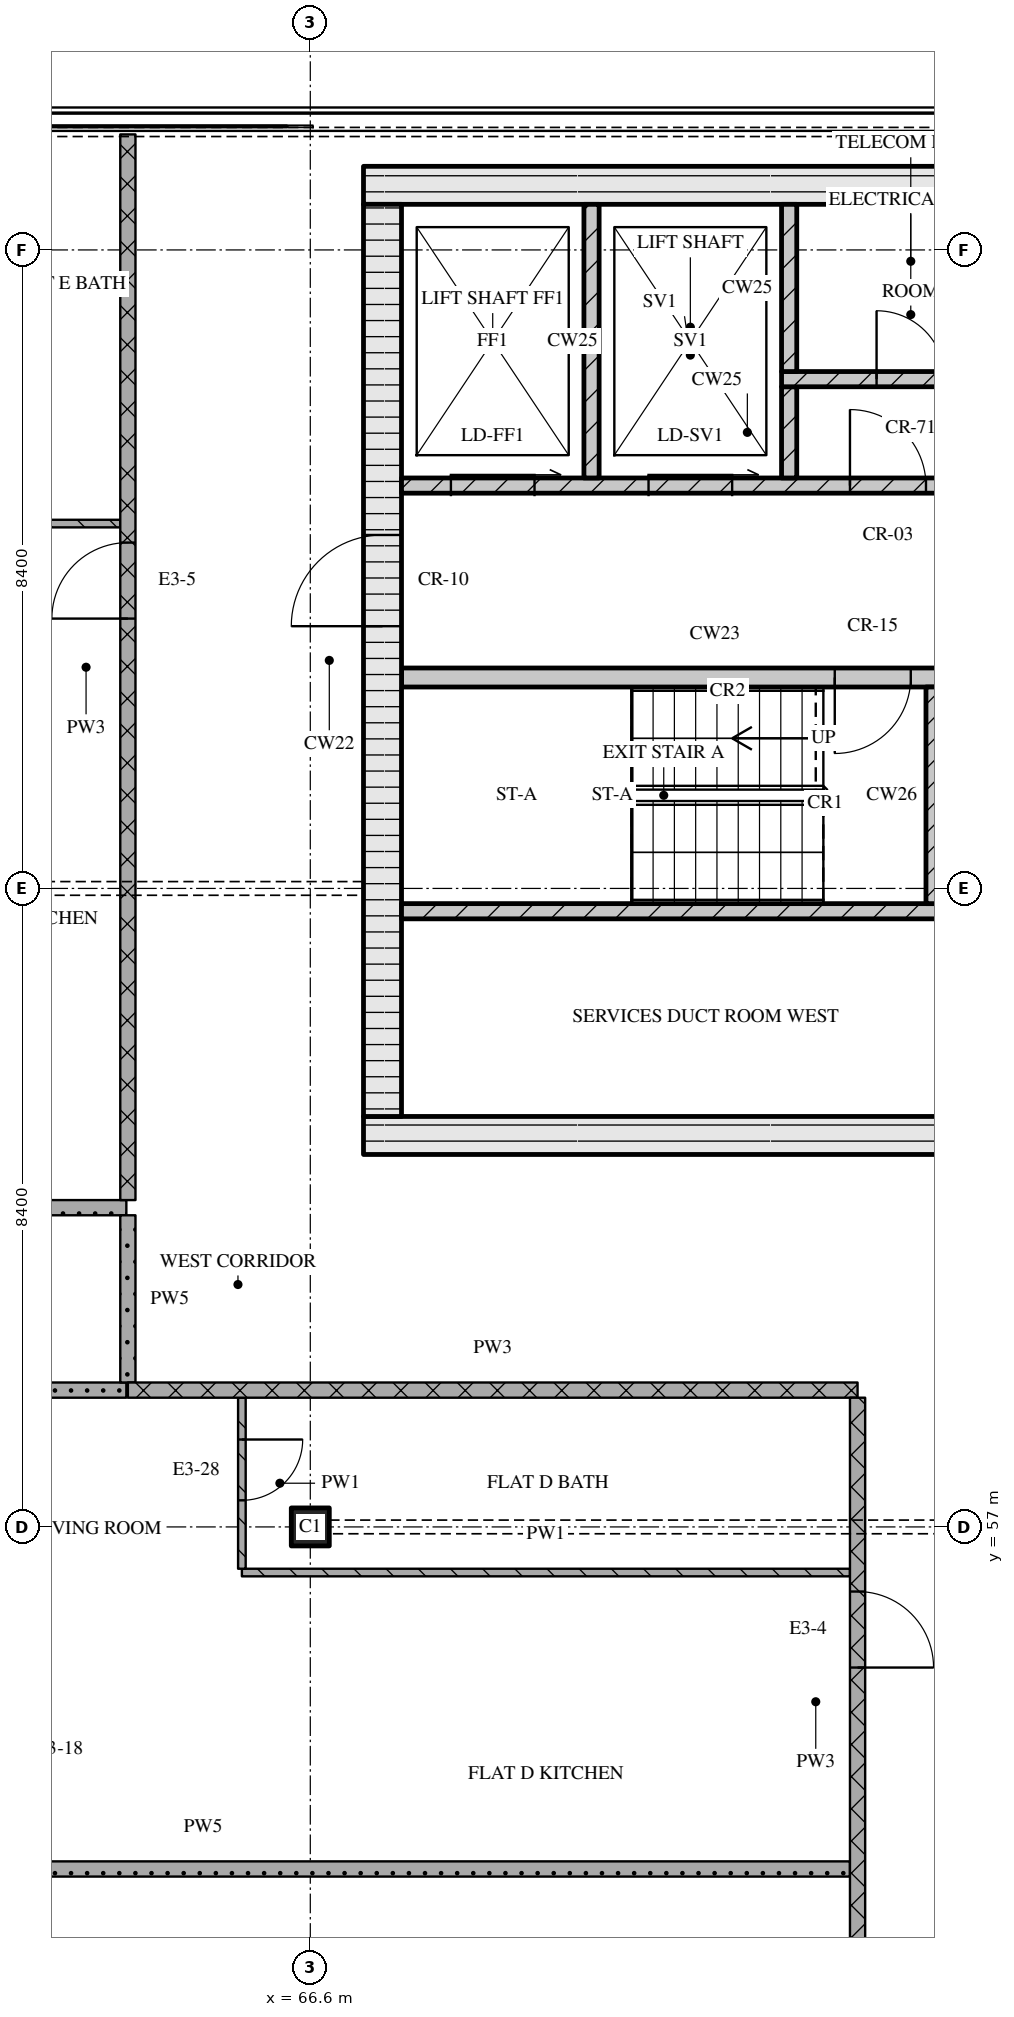
"""IFC4 building model, lengths in metres.
Left out: names, types, materials, properties, quantities, classifications, styles, units other than length and angle.
Written with IfcOpenShell. Run it as: python <this file> out.ifc"""

import sys

from ifc_helpers import new_model, si_unit, direction, frame, frame_2d, origin, origin_2d, place, context, subcontext, project, spatial, rectangle, extrude, element, fill, save


model = new_model("IFC4")
c1 = context("Model", 3, precision=1e-05, world=origin(), true_north=direction((0.0, 1.0)))
c2 = subcontext(c1, "Body", "Model", "MODEL_VIEW")
j1 = project(units=[si_unit("LENGTHUNIT", "METRE"), si_unit("PLANEANGLEUNIT", "RADIAN")], contexts=[c1])
p1 = place(None, origin())
s1 = spatial("IfcSite", under=j1, at=p1, CompositionType="ELEMENT")
p2 = place(p1, origin())
s2 = spatial("IfcBuilding", under=s1, at=p2, CompositionType="ELEMENT")
p3 = place(p2, frame((0.0, 0.0, 274.35)))
s3 = spatial("IfcBuildingStorey", under=s2, at=p3, CompositionType="ELEMENT", Elevation=274.35)
p4 = place(p3, frame((66.6, 57.0, 0.0), z_axis=(0.0, 0.0, 1.0), x_axis=(1.0, 0.0, 0.0)))
e1 = element("IfcColumn", 1, at=p4, inside=s3, PredefinedType="COLUMN", context=c2, shape_type="SweptSolid", body=[
    extrude(rectangle(XDim=0.5, YDim=0.5, at=origin_2d()), origin(), (0.0, 0.0, 1.0), 3.6),
])
p5 = place(p3, frame((67.3, 62.15, 0.0), z_axis=(0.0, 0.0, 1.0), x_axis=(1.0, 0.0, 0.0)))
e2 = element("IfcWall", 2, at=p5, inside=s3, PredefinedType="SOLIDWALL", context=c2, shape_type="SweptSolid", body=[
    extrude(rectangle(XDim=40.6, YDim=0.5, at=frame_2d((20.3, 0.0))), origin(), (0.0, 0.0, 1.0), 3.32),
])
p6 = place(p5, frame((20.65, 0.0, 0.0)))
e3 = element("IfcOpeningElement", 3, at=p6, cuts=e2, PredefinedType="OPENING", context=c2, shape_type="SweptSolid", body=[
    extrude(rectangle(XDim=1.8, YDim=2.1, at=frame_2d((0.9, 1.05))), frame((0.0, 0.26, 0.0), z_axis=(0.0, -1.0, 0.0), x_axis=(1.0, 0.0, 0.0)), (0.0, 0.0, 1.0), 0.52),
])
p7 = place(p3, frame((67.3, 74.65, 0.0), z_axis=(0.0, 0.0, 1.0), x_axis=(1.0, 0.0, 0.0)))
e4 = element("IfcWall", 4, at=p7, inside=s3, PredefinedType="SOLIDWALL", context=c2, shape_type="SweptSolid", body=[
    extrude(rectangle(XDim=40.6, YDim=0.5, at=frame_2d((20.3, 0.0))), origin(), (0.0, 0.0, 1.0), 3.32),
])
p8 = place(p3, frame((67.55, 62.4, 0.0), z_axis=(0.0, 0.0, 1.0), x_axis=(0.0, 1.0, 0.0)))
e5 = element("IfcWall", 5, at=p8, inside=s3, PredefinedType="SOLIDWALL", context=c2, shape_type="SweptSolid", body=[
    extrude(rectangle(XDim=12.0, YDim=0.5, at=frame_2d((6.0, 0.0))), origin(), (0.0, 0.0, 1.0), 3.32),
])
p9 = place(p8, frame((6.45, 0.0, 0.0)))
e6 = element("IfcOpeningElement", 6, at=p9, cuts=e5, PredefinedType="OPENING", context=c2, shape_type="SweptSolid", body=[
    extrude(rectangle(XDim=1.2, YDim=2.1, at=frame_2d((0.6, 1.05))), frame((0.0, 0.26, 0.0), z_axis=(0.0, -1.0, 0.0), x_axis=(1.0, 0.0, 0.0)), (0.0, 0.0, 1.0), 0.52),
])
p10 = place(p3, frame((67.8, 65.1, 0.0), z_axis=(0.0, 0.0, 1.0), x_axis=(1.0, 0.0, 0.0)))
e7 = element("IfcWall", 7, at=p10, inside=s3, PredefinedType="SOLIDWALL", context=c2, shape_type="SweptSolid", body=[
    extrude(rectangle(XDim=18.5, YDim=0.2, at=frame_2d((9.25, 0.0))), origin(), (0.0, 0.0, 1.0), 3.32),
])
p11 = place(p10, frame((7.27, 0.0, 0.0)))
e8 = element("IfcOpeningElement", 8, at=p11, cuts=e7, PredefinedType="OPENING", context=c2, shape_type="SweptSolid", body=[
    extrude(rectangle(XDim=0.9, YDim=2.1, at=frame_2d((0.45, 1.05))), frame((0.0, 0.11, 0.0), z_axis=(0.0, -1.0, 0.0), x_axis=(1.0, 0.0, 0.0)), (0.0, 0.0, 1.0), 0.22),
])
p12 = place(p10, frame((9.05, 0.0, 0.0)))
e9 = element("IfcOpeningElement", 9, at=p12, cuts=e7, PredefinedType="OPENING", context=c2, shape_type="SweptSolid", body=[
    extrude(rectangle(XDim=0.9, YDim=2.1, at=frame_2d((0.45, 1.05))), frame((0.0, 0.11, 0.0), z_axis=(0.0, -1.0, 0.0), x_axis=(1.0, 0.0, 0.0)), (0.0, 0.0, 1.0), 0.22),
])
p13 = place(p10, frame((12.76, 0.0, 0.0)))
e10 = element("IfcOpeningElement", 10, at=p13, cuts=e7, PredefinedType="OPENING", context=c2, shape_type="SweptSolid", body=[
    extrude(rectangle(XDim=0.9, YDim=2.1, at=frame_2d((0.45, 1.05))), frame((0.0, 0.11, 0.0), z_axis=(0.0, -1.0, 0.0), x_axis=(1.0, 0.0, 0.0)), (0.0, 0.0, 1.0), 0.22),
])
p14 = place(p10, frame((16.7, 0.0, 0.0)))
e11 = element("IfcOpeningElement", 11, at=p14, cuts=e7, PredefinedType="OPENING", context=c2, shape_type="SweptSolid", body=[
    extrude(rectangle(XDim=0.9, YDim=2.1, at=frame_2d((0.45, 1.05))), frame((0.0, 0.11, 0.0), z_axis=(0.0, -1.0, 0.0), x_axis=(1.0, 0.0, 0.0)), (0.0, 0.0, 1.0), 0.22),
])
p15 = place(p3, frame((74.85, 65.2, 0.0), z_axis=(0.0, 0.0, 1.0), x_axis=(0.0, 1.0, 0.0)))
e12 = element("IfcWall", 12, at=p15, inside=s3, PredefinedType="SOLIDWALL", context=c2, shape_type="SweptSolid", body=[
    extrude(rectangle(XDim=2.85, YDim=0.3, at=frame_2d((1.425, 0.0))), origin(), (0.0, 0.0, 1.0), 3.32),
])
p16 = place(p3, frame((67.8, 68.175, 0.0), z_axis=(0.0, 0.0, 1.0), x_axis=(1.0, 0.0, 0.0)))
e13 = element("IfcWall", 13, at=p16, inside=s3, PredefinedType="SOLIDWALL", context=c2, shape_type="SweptSolid", body=[
    extrude(rectangle(XDim=8.25, YDim=0.25, at=frame_2d((4.125, 0.0))), origin(), (0.0, 0.0, 1.0), 3.32),
])
p17 = place(p16, frame((5.7, 0.0, 0.0)))
e14 = element("IfcOpeningElement", 14, at=p17, cuts=e13, PredefinedType="OPENING", context=c2, shape_type="SweptSolid", body=[
    extrude(rectangle(XDim=1.0, YDim=2.1, at=frame_2d((0.5, 1.05))), frame((0.0, 0.135, 0.0), z_axis=(0.0, -1.0, 0.0), x_axis=(1.0, 0.0, 0.0)), (0.0, 0.0, 1.0), 0.27),
])
p18 = place(p16, frame((7.2, 0.0, 0.0)))
e15 = element("IfcOpeningElement", 15, at=p18, cuts=e13, PredefinedType="OPENING", context=c2, shape_type="SweptSolid", body=[
    extrude(rectangle(XDim=0.8, YDim=2.1, at=frame_2d((0.4, 1.05))), frame((0.0, 0.135, 0.0), z_axis=(0.0, -1.0, 0.0), x_axis=(1.0, 0.0, 0.0)), (0.0, 0.0, 1.0), 0.27),
])
p19 = place(p3, frame((67.8, 70.7, 0.0), z_axis=(0.0, 0.0, 1.0), x_axis=(1.0, 0.0, 0.0)))
e16 = element("IfcWall", 16, at=p19, inside=s3, PredefinedType="SOLIDWALL", context=c2, shape_type="SweptSolid", body=[
    extrude(rectangle(XDim=39.6, YDim=0.2, at=frame_2d((19.8, 0.0))), origin(), (0.0, 0.0, 1.0), 3.32),
])
p20 = place(p19, frame((0.65, 0.0, 0.0)))
e17 = element("IfcOpeningElement", 17, at=p20, cuts=e16, PredefinedType="OPENING", context=c2, shape_type="SweptSolid", body=[
    extrude(rectangle(XDim=1.1, YDim=2.1, at=frame_2d((0.55, 1.05))), frame((0.0, 0.11, 0.0), z_axis=(0.0, -1.0, 0.0), x_axis=(1.0, 0.0, 0.0)), (0.0, 0.0, 1.0), 0.22),
])
p21 = place(p19, frame((3.25, 0.0, 0.0)))
e18 = element("IfcOpeningElement", 18, at=p21, cuts=e16, PredefinedType="OPENING", context=c2, shape_type="SweptSolid", body=[
    extrude(rectangle(XDim=1.1, YDim=2.1, at=frame_2d((0.55, 1.05))), frame((0.0, 0.11, 0.0), z_axis=(0.0, -1.0, 0.0), x_axis=(1.0, 0.0, 0.0)), (0.0, 0.0, 1.0), 0.22),
])
p22 = place(p19, frame((5.9, 0.0, 0.0)))
e19 = element("IfcOpeningElement", 19, at=p22, cuts=e16, PredefinedType="OPENING", context=c2, shape_type="SweptSolid", body=[
    extrude(rectangle(XDim=1.0, YDim=2.1, at=frame_2d((0.5, 1.05))), frame((0.0, 0.11, 0.0), z_axis=(0.0, -1.0, 0.0), x_axis=(1.0, 0.0, 0.0)), (0.0, 0.0, 1.0), 0.22),
])
p23 = place(p19, frame((21.7, 0.0, 0.0)))
e20 = element("IfcOpeningElement", 20, at=p23, cuts=e16, PredefinedType="OPENING", context=c2, shape_type="SweptSolid", body=[
    extrude(rectangle(XDim=1.0, YDim=2.1, at=frame_2d((0.5, 1.05))), frame((0.0, 0.11, 0.0), z_axis=(0.0, -1.0, 0.0), x_axis=(1.0, 0.0, 0.0)), (0.0, 0.0, 1.0), 0.22),
])
p24 = place(p19, frame((32.7, 0.0, 0.0)))
e21 = element("IfcOpeningElement", 21, at=p24, cuts=e16, PredefinedType="OPENING", context=c2, shape_type="SweptSolid", body=[
    extrude(rectangle(XDim=1.0, YDim=2.1, at=frame_2d((0.5, 1.05))), frame((0.0, 0.11, 0.0), z_axis=(0.0, -1.0, 0.0), x_axis=(1.0, 0.0, 0.0)), (0.0, 0.0, 1.0), 0.22),
])
p25 = place(p19, frame((35.25, 0.0, 0.0)))
e22 = element("IfcOpeningElement", 22, at=p25, cuts=e16, PredefinedType="OPENING", context=c2, shape_type="SweptSolid", body=[
    extrude(rectangle(XDim=1.1, YDim=2.1, at=frame_2d((0.55, 1.05))), frame((0.0, 0.11, 0.0), z_axis=(0.0, -1.0, 0.0), x_axis=(1.0, 0.0, 0.0)), (0.0, 0.0, 1.0), 0.22),
])
p26 = place(p19, frame((37.85, 0.0, 0.0)))
e23 = element("IfcOpeningElement", 23, at=p26, cuts=e16, PredefinedType="OPENING", context=c2, shape_type="SweptSolid", body=[
    extrude(rectangle(XDim=1.1, YDim=2.1, at=frame_2d((0.55, 1.05))), frame((0.0, 0.11, 0.0), z_axis=(0.0, -1.0, 0.0), x_axis=(1.0, 0.0, 0.0)), (0.0, 0.0, 1.0), 0.22),
])
p27 = place(p3, frame((70.3, 70.8, 0.0), z_axis=(0.0, 0.0, 1.0), x_axis=(0.0, 1.0, 0.0)))
e24 = element("IfcWall", 24, at=p27, inside=s3, PredefinedType="SOLIDWALL", context=c2, shape_type="SweptSolid", body=[
    extrude(rectangle(XDim=3.6, YDim=0.2, at=frame_2d((1.8, 0.0))), origin(), (0.0, 0.0, 1.0), 3.32),
])
p28 = place(p3, frame((72.9, 70.8, 0.0), z_axis=(0.0, 0.0, 1.0), x_axis=(0.0, 1.0, 0.0)))
e25 = element("IfcWall", 25, at=p28, inside=s3, PredefinedType="SOLIDWALL", context=c2, shape_type="SweptSolid", body=[
    extrude(rectangle(XDim=1.2, YDim=0.2, at=frame_2d((0.6, 0.0))), origin(), (0.0, 0.0, 1.0), 3.32),
])
p29 = place(p3, frame((72.8, 72.1, 0.0), z_axis=(0.0, 0.0, 1.0), x_axis=(1.0, 0.0, 0.0)))
e26 = element("IfcWall", 26, at=p29, inside=s3, PredefinedType="SOLIDWALL", context=c2, shape_type="SweptSolid", body=[
    extrude(rectangle(XDim=7.72, YDim=0.2, at=frame_2d((3.86, 0.0))), origin(), (0.0, 0.0, 1.0), 3.32),
])
p30 = place(p29, frame((1.25, 0.0, 0.0)))
e27 = element("IfcOpeningElement", 27, at=p30, cuts=e26, PredefinedType="OPENING", context=c2, shape_type="SweptSolid", body=[
    extrude(rectangle(XDim=0.9, YDim=2.1, at=frame_2d((0.45, 1.05))), frame((0.0, 0.11, 0.0), z_axis=(0.0, -1.0, 0.0), x_axis=(1.0, 0.0, 0.0)), (0.0, 0.0, 1.0), 0.22),
])
p31 = place(p29, frame((4.2, 0.0, 0.0)))
e28 = element("IfcOpeningElement", 28, at=p31, cuts=e26, PredefinedType="OPENING", context=c2, shape_type="SweptSolid", body=[
    extrude(rectangle(XDim=0.9, YDim=2.1, at=frame_2d((0.45, 1.05))), frame((0.0, 0.11, 0.0), z_axis=(0.0, -1.0, 0.0), x_axis=(1.0, 0.0, 0.0)), (0.0, 0.0, 1.0), 0.22),
])
p32 = place(p29, frame((6.36, 0.0, 0.0)))
e29 = element("IfcOpeningElement", 29, at=p32, cuts=e26, PredefinedType="OPENING", context=c2, shape_type="SweptSolid", body=[
    extrude(rectangle(XDim=0.9, YDim=2.1, at=frame_2d((0.45, 1.05))), frame((0.0, 0.11, 0.0), z_axis=(0.0, -1.0, 0.0), x_axis=(1.0, 0.0, 0.0)), (0.0, 0.0, 1.0), 0.22),
])
p33 = place(p3, frame((72.9, 72.2, 0.0), z_axis=(0.0, 0.0, 1.0), x_axis=(0.0, 1.0, 0.0)))
e30 = element("IfcWall", 30, at=p33, inside=s3, PredefinedType="SOLIDWALL", context=c2, shape_type="SweptSolid", body=[
    extrude(rectangle(XDim=2.2, YDim=0.2, at=frame_2d((1.1, 0.0))), origin(), (0.0, 0.0, 1.0), 3.32),
])
p34 = place(p3, frame((56.68, 52.5, 0.0), z_axis=(0.0, 0.0, 1.0), x_axis=(1.0, 0.0, 0.0)))
e31 = element("IfcWall", 31, at=p34, inside=s3, PredefinedType="PARTITIONING", context=c2, shape_type="SweptSolid", body=[
    extrude(rectangle(XDim=17.02, YDim=0.2, at=frame_2d((8.51, 0.0))), origin(), (0.0, 0.0, 1.0), 3.32),
])
p35 = place(p3, frame((65.7, 56.4, 0.0), z_axis=(0.0, 0.0, 1.0), x_axis=(1.0, 0.0, 0.0)))
e32 = element("IfcWall", 32, at=p35, inside=s3, PredefinedType="PARTITIONING", context=c2, shape_type="SweptSolid", body=[
    extrude(rectangle(XDim=8.0, YDim=0.1, at=frame_2d((4.0, 0.0))), origin(), (0.0, 0.0, 1.0), 3.32),
])
p36 = place(p3, frame((64.2, 58.8, 0.0), z_axis=(0.0, 0.0, 1.0), x_axis=(1.0, 0.0, 0.0)))
e33 = element("IfcWall", 33, at=p36, inside=s3, PredefinedType="PARTITIONING", context=c2, shape_type="SweptSolid", body=[
    extrude(rectangle(XDim=9.6, YDim=0.2, at=frame_2d((4.8, 0.0))), origin(), (0.0, 0.0, 1.0), 3.32),
])
p37 = place(p3, frame((56.7, 58.8, 0.0), z_axis=(0.0, 0.0, 1.0), x_axis=(1.0, 0.0, 0.0)))
e34 = element("IfcWall", 34, at=p37, inside=s3, PredefinedType="PARTITIONING", context=c2, shape_type="SweptSolid", body=[
    extrude(rectangle(XDim=7.48, YDim=0.2, at=frame_2d((3.74, 0.0))), origin(), (0.0, 0.0, 1.0), 3.32),
])
p38 = place(p3, frame((61.52, 61.2, 0.0), z_axis=(0.0, 0.0, 1.0), x_axis=(1.0, 0.0, 0.0)))
e35 = element("IfcWall", 35, at=p38, inside=s3, PredefinedType="PARTITIONING", context=c2, shape_type="SweptSolid", body=[
    extrude(rectangle(XDim=2.66, YDim=0.2, at=frame_2d((1.33, 0.0))), origin(), (0.0, 0.0, 1.0), 3.32),
])
p39 = place(p3, frame((61.5, 70.2, 0.0), z_axis=(0.0, 0.0, 1.0), x_axis=(1.0, 0.0, 0.0)))
e36 = element("IfcWall", 36, at=p39, inside=s3, PredefinedType="PARTITIONING", context=c2, shape_type="SweptSolid", body=[
    extrude(rectangle(XDim=2.6, YDim=0.1, at=frame_2d((1.3, 0.0))), origin(), (0.0, 0.0, 1.0), 3.32),
])
p40 = place(p3, frame((64.2, 61.3, 0.0), z_axis=(0.0, 0.0, 1.0), x_axis=(0.0, 1.0, 0.0)))
e37 = element("IfcWall", 37, at=p40, inside=s3, PredefinedType="PARTITIONING", context=c2, shape_type="SweptSolid", body=[
    extrude(rectangle(XDim=14.02, YDim=0.2, at=frame_2d((7.01, 0.0))), origin(), (0.0, 0.0, 1.0), 3.32),
])
p41 = place(p40, frame((7.65, 0.0, 0.0)))
e38 = element("IfcOpeningElement", 38, at=p41, cuts=e37, PredefinedType="OPENING", context=c2, shape_type="SweptSolid", body=[
    extrude(rectangle(XDim=1.0, YDim=2.1, at=frame_2d((0.5, 1.05))), frame((0.0, 0.11, 0.0), z_axis=(0.0, -1.0, 0.0), x_axis=(1.0, 0.0, 0.0)), (0.0, 0.0, 1.0), 0.22),
])
p42 = place(p3, frame((64.2, 61.1, 0.0), z_axis=(0.0, 0.0, 1.0), x_axis=(0.0, -1.0, 0.0)))
e39 = element("IfcWall", 39, at=p42, inside=s3, PredefinedType="PARTITIONING", context=c2, shape_type="SweptSolid", body=[
    extrude(rectangle(XDim=2.2, YDim=0.2, at=frame_2d((1.1, 0.0))), origin(), (0.0, 0.0, 1.0), 3.32),
])
p43 = place(p3, frame((65.7, 58.7, 0.0), z_axis=(0.0, 0.0, 1.0), x_axis=(0.0, -1.0, 0.0)))
e40 = element("IfcWall", 40, at=p43, inside=s3, PredefinedType="PARTITIONING", context=c2, shape_type="SweptSolid", body=[
    extrude(rectangle(XDim=2.25, YDim=0.1, at=frame_2d((1.125, 0.0))), origin(), (0.0, 0.0, 1.0), 3.32),
])
p44 = place(p43, frame((0.55, 0.0, 0.0)))
e41 = element("IfcOpeningElement", 41, at=p44, cuts=e40, PredefinedType="OPENING", context=c2, shape_type="SweptSolid", body=[
    extrude(rectangle(XDim=0.8, YDim=2.1, at=frame_2d((0.4, 1.05))), frame((0.0, 0.06, 0.0), z_axis=(0.0, -1.0, 0.0), x_axis=(1.0, 0.0, 0.0)), (0.0, 0.0, 1.0), 0.12),
])
p45 = place(p3, frame((73.8, 50.7, 0.0), z_axis=(0.0, 0.0, 1.0), x_axis=(0.0, 1.0, 0.0)))
e42 = element("IfcWall", 42, at=p45, inside=s3, PredefinedType="PARTITIONING", context=c2, shape_type="SweptSolid", body=[
    extrude(rectangle(XDim=8.0, YDim=0.2, at=frame_2d((4.0, 0.0))), origin(), (0.0, 0.0, 1.0), 3.32),
])
p46 = place(p45, frame((4.45, 0.0, 0.0)))
e43 = element("IfcOpeningElement", 43, at=p46, cuts=e42, PredefinedType="OPENING", context=c2, shape_type="SweptSolid", body=[
    extrude(rectangle(XDim=1.0, YDim=2.1, at=frame_2d((0.5, 1.05))), frame((0.0, 0.11, 0.0), z_axis=(0.0, -1.0, 0.0), x_axis=(1.0, 0.0, 0.0)), (0.0, 0.0, 1.0), 0.22),
])
p47 = place(p17, origin())
e44 = element("IfcDoor", 44, at=p47, inside=s3, OperationType="SINGLE_SWING_RIGHT", PredefinedType="DOOR", context=c2, shape_type="SweptSolid", body=[
    extrude(rectangle(XDim=1.0, YDim=2.1, at=frame_2d((0.5, 1.05))), frame((0.0, 0.025, 0.0), z_axis=(0.0, -1.0, 0.0), x_axis=(1.0, 0.0, 0.0)), (0.0, 0.0, 1.0), 0.05),
])
fill(e14, e44)
p48 = place(p9, origin())
e45 = element("IfcDoor", 45, at=p48, inside=s3, OperationType="SINGLE_SWING_LEFT", PredefinedType="DOOR", context=c2, shape_type="SweptSolid", body=[
    extrude(rectangle(XDim=1.2, YDim=2.1, at=frame_2d((0.6, 1.05))), frame((0.0, 0.025, 0.0), z_axis=(0.0, -1.0, 0.0), x_axis=(1.0, 0.0, 0.0)), (0.0, 0.0, 1.0), 0.05),
])
fill(e6, e45)
p49 = place(p20, origin())
e46 = element("IfcDoor", 46, at=p49, inside=s3, OperationType="SLIDING_TO_RIGHT", PredefinedType="DOOR", context=c2, shape_type="SweptSolid", body=[
    extrude(rectangle(XDim=1.1, YDim=2.1, at=frame_2d((0.55, 1.05))), frame((0.0, 0.025, 0.0), z_axis=(0.0, -1.0, 0.0), x_axis=(1.0, 0.0, 0.0)), (0.0, 0.0, 1.0), 0.05),
])
fill(e17, e46)
p50 = place(p21, origin())
e47 = element("IfcDoor", 47, at=p50, inside=s3, OperationType="SLIDING_TO_RIGHT", PredefinedType="DOOR", context=c2, shape_type="SweptSolid", body=[
    extrude(rectangle(XDim=1.1, YDim=2.1, at=frame_2d((0.55, 1.05))), frame((0.0, 0.025, 0.0), z_axis=(0.0, -1.0, 0.0), x_axis=(1.0, 0.0, 0.0)), (0.0, 0.0, 1.0), 0.05),
])
fill(e18, e47)
p51 = place(p22, origin())
e48 = element("IfcDoor", 48, at=p51, inside=s3, OperationType="SINGLE_SWING_LEFT", PredefinedType="DOOR", context=c2, shape_type="SweptSolid", body=[
    extrude(rectangle(XDim=1.0, YDim=2.1, at=frame_2d((0.5, 1.05))), frame((0.0, 0.025, 0.0), z_axis=(0.0, -1.0, 0.0), x_axis=(1.0, 0.0, 0.0)), (0.0, 0.0, 1.0), 0.05),
])
fill(e19, e48)
p52 = place(p30, origin())
e49 = element("IfcDoor", 49, at=p52, inside=s3, OperationType="SINGLE_SWING_LEFT", PredefinedType="DOOR", context=c2, shape_type="SweptSolid", body=[
    extrude(rectangle(XDim=0.9, YDim=2.1, at=frame_2d((0.45, 1.05))), frame((0.0, 0.025, 0.0), z_axis=(0.0, -1.0, 0.0), x_axis=(1.0, 0.0, 0.0)), (0.0, 0.0, 1.0), 0.05),
])
fill(e27, e49)
p53 = place(p41, origin())
e50 = element("IfcDoor", 50, at=p53, inside=s3, OperationType="SINGLE_SWING_LEFT", PredefinedType="DOOR", context=c2, shape_type="SweptSolid", body=[
    extrude(rectangle(XDim=1.0, YDim=2.1, at=frame_2d((0.5, 1.05))), frame((0.0, 0.025, 0.0), z_axis=(0.0, -1.0, 0.0), x_axis=(1.0, 0.0, 0.0)), (0.0, 0.0, 1.0), 0.05),
])
fill(e38, e50)
p54 = place(p44, origin())
e51 = element("IfcDoor", 51, at=p54, inside=s3, OperationType="SINGLE_SWING_LEFT", PredefinedType="DOOR", context=c2, shape_type="SweptSolid", body=[
    extrude(rectangle(XDim=0.8, YDim=2.1, at=frame_2d((0.4, 1.05))), frame((0.0, 0.025, 0.0), z_axis=(0.0, -1.0, 0.0), x_axis=(1.0, 0.0, 0.0)), (0.0, 0.0, 1.0), 0.05),
])
fill(e41, e51)
p55 = place(p46, origin())
e52 = element("IfcDoor", 52, at=p55, inside=s3, OperationType="SINGLE_SWING_RIGHT", PredefinedType="DOOR", context=c2, shape_type="SweptSolid", body=[
    extrude(rectangle(XDim=1.0, YDim=2.1, at=frame_2d((0.5, 1.05))), frame((0.0, 0.025, 0.0), z_axis=(0.0, -1.0, 0.0), x_axis=(1.0, 0.0, 0.0)), (0.0, 0.0, 1.0), 0.05),
])
fill(e43, e52)
save(model, sys.argv[1])
